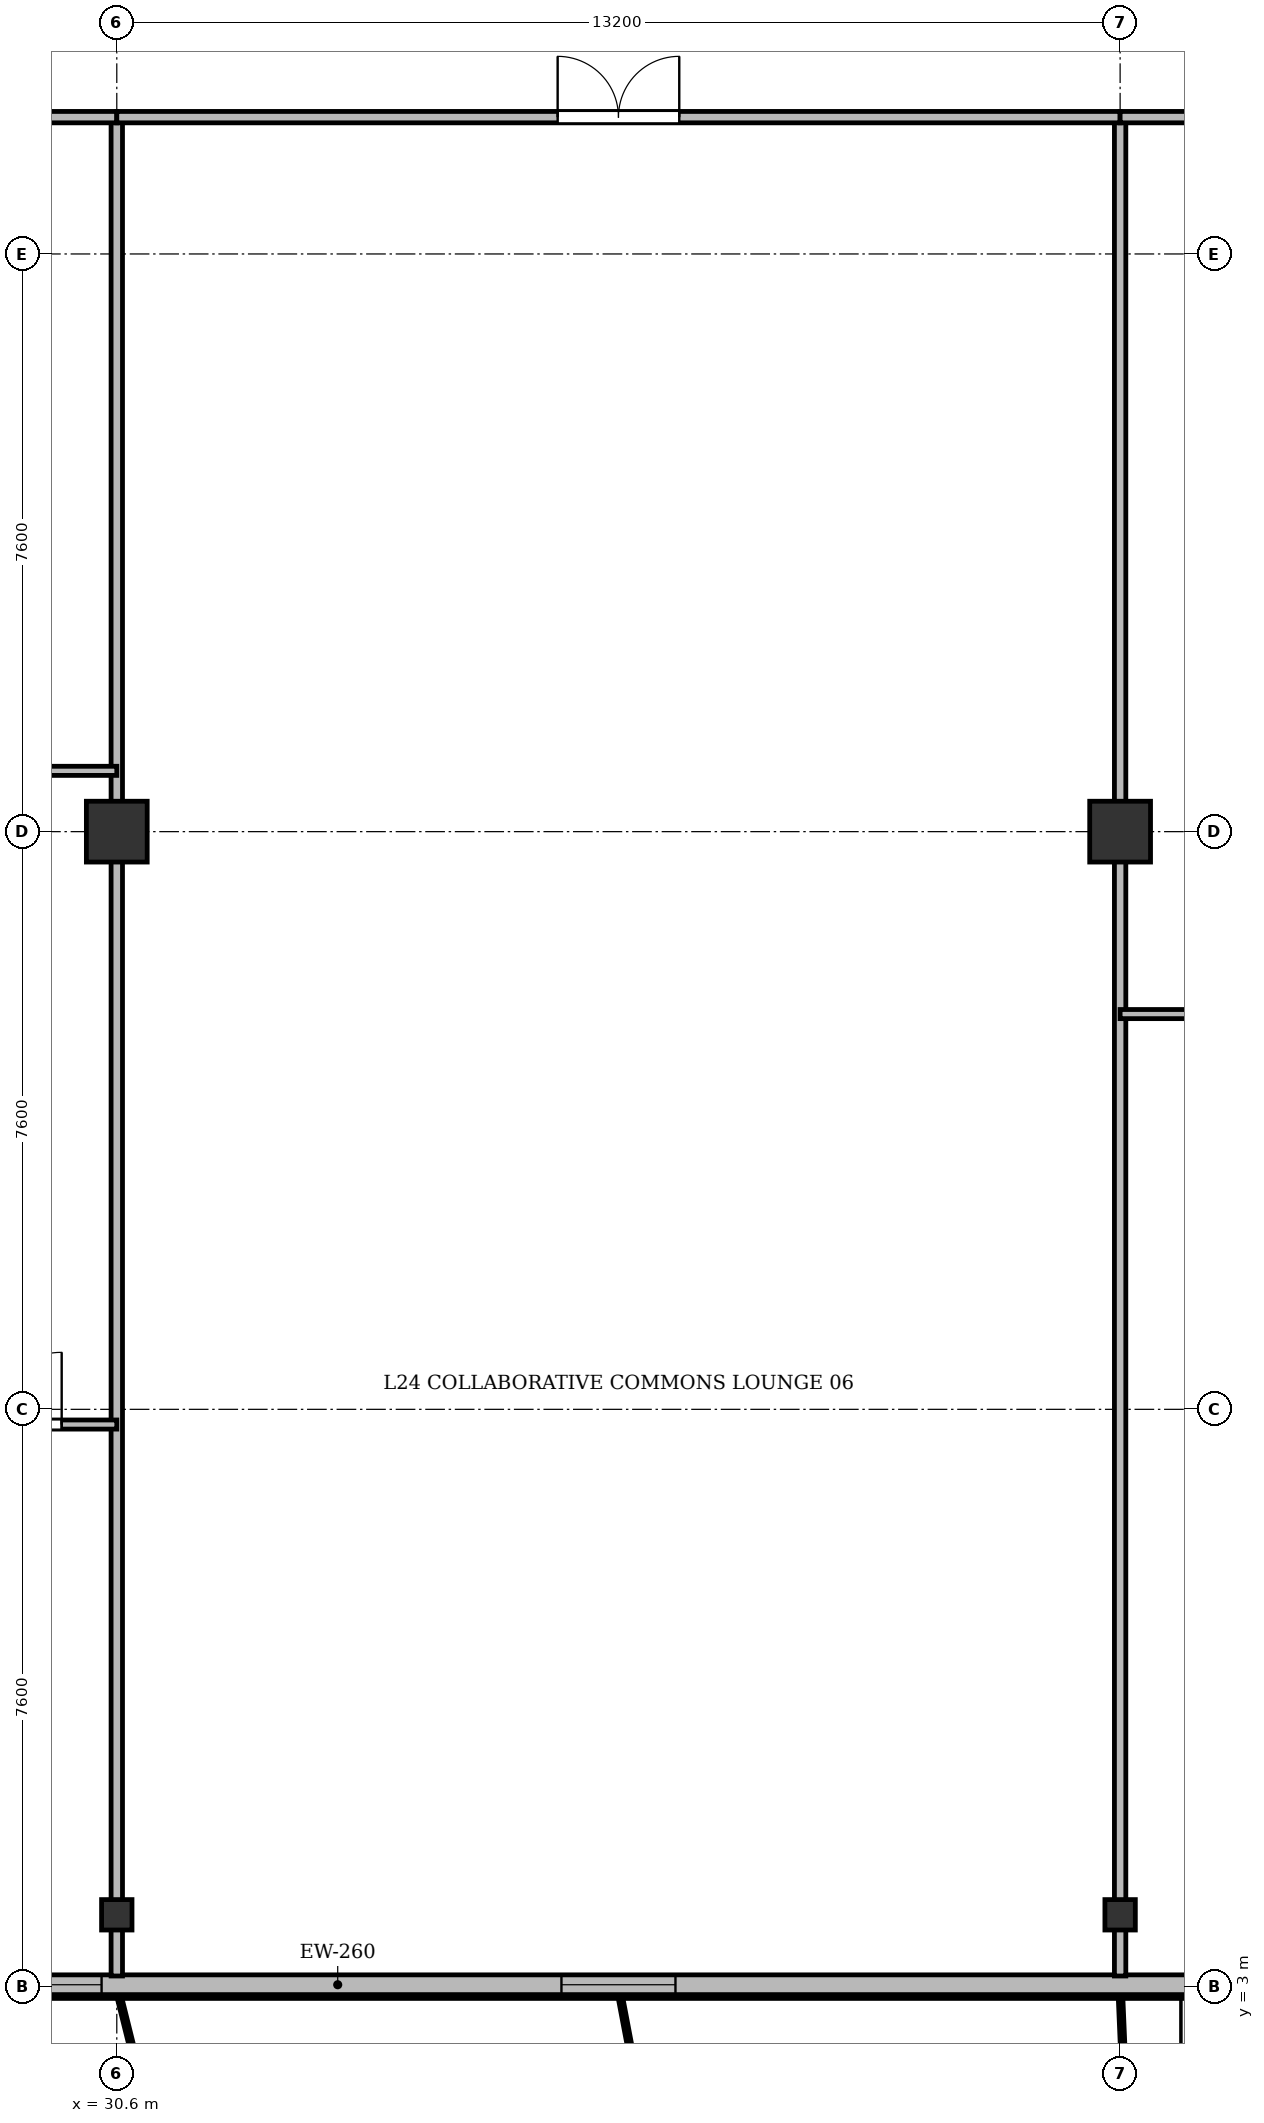
"""IFC4 building model, lengths in metres.
Left out: names, types, materials, properties, quantities, classifications, styles, units other than length and angle.
Written with IfcOpenShell. Run it as: python <this file> out.ifc"""

import sys

from ifc_helpers import new_model, si_unit, direction, frame, frame_2d, origin, origin_2d, place, context, subcontext, project, spatial, rectangle, i_section, extrude, source, transform, mapped, element, fill, save


model = new_model("IFC4")
c1 = context("Model", 3, precision=1e-05, world=origin(), true_north=direction((0.0, 1.0)))
c2 = subcontext(c1, "Body", "Model", "MODEL_VIEW")
j1 = project(units=[si_unit("LENGTHUNIT", "METRE"), si_unit("PLANEANGLEUNIT", "RADIAN")], contexts=[c1])
p1 = place(None, origin())
s1 = spatial("IfcSite", under=j1, at=p1, CompositionType="ELEMENT")
p2 = place(p1, origin())
s2 = spatial("IfcBuilding", under=s1, at=p2, CompositionType="ELEMENT")
p3 = place(p2, frame((0.0, 0.0, 96.1)))
s3 = spatial("IfcBuildingStorey", under=s2, at=p3, CompositionType="ELEMENT", Elevation=96.1)
m1 = source(origin(), c2, "Body", "SweptSolid", [
    extrude(i_section(OverallWidth=0.4, OverallDepth=0.4, WebThickness=0.022, FlangeThickness=0.035, at=origin_2d()), origin(), (0.0, 0.0, 1.0), 3.6),
])
p4 = place(p3, frame((30.6, 3.95, 0.0), z_axis=(0.0, 0.0, 1.0), x_axis=(1.0, 0.0, 0.0)))
e1 = element("IfcColumn", 1, at=p4, inside=s3, PredefinedType="COLUMN", context=c2, shape_type="MappedRepresentation", body=[
    mapped(m1, transform((0.0, 0.0, 0.0), x_axis=(1.0, 0.0, 0.0), y_axis=(0.0, 1.0, 0.0), z_axis=(0.0, 0.0, 1.0), scale=1.0)),
])
m2 = source(origin(), c2, "Body", "SweptSolid", [
    extrude(rectangle(XDim=0.8, YDim=0.8, at=origin_2d()), origin(), (0.0, 0.0, 1.0), 3.6),
])
p5 = place(p3, frame((30.6, 18.2, 0.0), z_axis=(0.0, 0.0, 1.0), x_axis=(1.0, 0.0, 0.0)))
e2 = element("IfcColumn", 2, at=p5, inside=s3, PredefinedType="COLUMN", context=c2, shape_type="MappedRepresentation", body=[
    mapped(m2, transform((0.0, 0.0, 0.0), x_axis=(1.0, 0.0, 0.0), y_axis=(0.0, 1.0, 0.0), z_axis=(0.0, 0.0, 1.0), scale=1.0)),
])
p6 = place(p3, frame((43.8, 3.95, 0.0), z_axis=(0.0, 0.0, 1.0), x_axis=(1.0, 0.0, 0.0)))
e3 = element("IfcColumn", 3, at=p6, inside=s3, PredefinedType="COLUMN", context=c2, shape_type="MappedRepresentation", body=[
    mapped(m1, transform((0.0, 0.0, 0.0), x_axis=(1.0, 0.0, 0.0), y_axis=(0.0, 1.0, 0.0), z_axis=(0.0, 0.0, 1.0), scale=1.0)),
])
p7 = place(p3, frame((43.8, 18.2, 0.0), z_axis=(0.0, 0.0, 1.0), x_axis=(1.0, 0.0, 0.0)))
e4 = element("IfcColumn", 4, at=p7, inside=s3, PredefinedType="COLUMN", context=c2, shape_type="MappedRepresentation", body=[
    mapped(m2, transform((0.0, 0.0, 0.0), x_axis=(1.0, 0.0, 0.0), y_axis=(0.0, 1.0, 0.0), z_axis=(0.0, 0.0, 1.0), scale=1.0)),
])
p8 = place(p3, frame((66.9, 3.03, 0.0), z_axis=(0.0, 0.0, 1.0), x_axis=(-1.0, 0.0, 0.0)))
e5 = element("IfcWall", 5, at=p8, inside=s3, PredefinedType="SOLIDWALL", context=c2, shape_type="SweptSolid", body=[
    extrude(rectangle(XDim=59.4, YDim=0.26, at=frame_2d((29.7, 0.0))), origin(), (0.0, 0.0, 1.0), 3.34),
])
p9 = place(p8, frame((2.1, 0.0, 0.9)))
e6 = element("IfcOpeningElement", 6, at=p9, cuts=e5, PredefinedType="OPENING", context=c2, shape_type="SweptSolid", body=[
    extrude(rectangle(XDim=1.8, YDim=1.8, at=frame_2d((0.9, 0.9))), frame((0.0, 0.14, 0.0), z_axis=(0.0, -1.0, 0.0), x_axis=(1.0, 0.0, 0.0)), (0.0, 0.0, 1.0), 0.28),
])
p10 = place(p8, frame((5.3, 0.0, 0.9)))
e7 = element("IfcOpeningElement", 7, at=p10, cuts=e5, PredefinedType="OPENING", context=c2, shape_type="SweptSolid", body=[
    extrude(rectangle(XDim=2.2, YDim=1.8, at=frame_2d((1.1, 0.9))), frame((0.0, 0.14, 0.0), z_axis=(0.0, -1.0, 0.0), x_axis=(1.0, 0.0, 0.0)), (0.0, 0.0, 1.0), 0.28),
])
p11 = place(p8, frame((8.65, 0.0, 0.9)))
e8 = element("IfcOpeningElement", 8, at=p11, cuts=e5, PredefinedType="OPENING", context=c2, shape_type="SweptSolid", body=[
    extrude(rectangle(XDim=1.5, YDim=1.75, at=frame_2d((0.75, 0.875))), frame((0.0, 0.14, 0.0), z_axis=(0.0, -1.0, 0.0), x_axis=(1.0, 0.0, 0.0)), (0.0, 0.0, 1.0), 0.28),
])
p12 = place(p8, frame((11.0, 0.0, 0.9)))
e9 = element("IfcOpeningElement", 9, at=p12, cuts=e5, PredefinedType="OPENING", context=c2, shape_type="SweptSolid", body=[
    extrude(rectangle(XDim=2.0, YDim=1.95, at=frame_2d((1.0, 0.975))), frame((0.0, 0.14, 0.0), z_axis=(0.0, -1.0, 0.0), x_axis=(1.0, 0.0, 0.0)), (0.0, 0.0, 1.0), 0.28),
])
p13 = place(p8, frame((13.775, 0.0, 0.9)))
e10 = element("IfcOpeningElement", 10, at=p13, cuts=e5, PredefinedType="OPENING", context=c2, shape_type="SweptSolid", body=[
    extrude(rectangle(XDim=1.65, YDim=1.85, at=frame_2d((0.825, 0.925))), frame((0.0, 0.14, 0.0), z_axis=(0.0, -1.0, 0.0), x_axis=(1.0, 0.0, 0.0)), (0.0, 0.0, 1.0), 0.28),
])
p14 = place(p8, frame((16.7, 0.0, 0.9)))
e11 = element("IfcOpeningElement", 11, at=p14, cuts=e5, PredefinedType="OPENING", context=c2, shape_type="SweptSolid", body=[
    extrude(rectangle(XDim=1.8, YDim=1.8, at=frame_2d((0.9, 0.9))), frame((0.0, 0.14, 0.0), z_axis=(0.0, -1.0, 0.0), x_axis=(1.0, 0.0, 0.0)), (0.0, 0.0, 1.0), 0.28),
])
p15 = place(p8, frame((20.227, 0.0, 0.0)))
e12 = element("IfcOpeningElement", 12, at=p15, cuts=e5, PredefinedType="OPENING", context=c2, shape_type="SweptSolid", body=[
    extrude(rectangle(XDim=1.2, YDim=2.2, at=frame_2d((0.6, 1.1))), frame((0.0, 0.14, 0.0), z_axis=(0.0, -1.0, 0.0), x_axis=(1.0, 0.0, 0.0)), (0.0, 0.0, 1.0), 0.28),
])
p16 = place(p8, frame((28.95, 0.0, 0.9)))
e13 = element("IfcOpeningElement", 13, at=p16, cuts=e5, PredefinedType="OPENING", context=c2, shape_type="SweptSolid", body=[
    extrude(rectangle(XDim=1.5, YDim=1.75, at=frame_2d((0.75, 0.875))), frame((0.0, 0.14, 0.0), z_axis=(0.0, -1.0, 0.0), x_axis=(1.0, 0.0, 0.0)), (0.0, 0.0, 1.0), 0.28),
])
p17 = place(p8, frame((36.5, 0.0, 0.9)))
e14 = element("IfcOpeningElement", 14, at=p17, cuts=e5, PredefinedType="OPENING", context=c2, shape_type="SweptSolid", body=[
    extrude(rectangle(XDim=2.0, YDim=1.95, at=frame_2d((1.0, 0.975))), frame((0.0, 0.14, 0.0), z_axis=(0.0, -1.0, 0.0), x_axis=(1.0, 0.0, 0.0)), (0.0, 0.0, 1.0), 0.28),
])
p18 = place(p8, frame((39.075, 0.0, 0.9)))
e15 = element("IfcOpeningElement", 15, at=p18, cuts=e5, PredefinedType="OPENING", context=c2, shape_type="SweptSolid", body=[
    extrude(rectangle(XDim=1.65, YDim=1.85, at=frame_2d((0.825, 0.925))), frame((0.0, 0.14, 0.0), z_axis=(0.0, -1.0, 0.0), x_axis=(1.0, 0.0, 0.0)), (0.0, 0.0, 1.0), 0.28),
])
p19 = place(p8, frame((41.4, 0.0, 0.9)))
e16 = element("IfcOpeningElement", 16, at=p19, cuts=e5, PredefinedType="OPENING", context=c2, shape_type="SweptSolid", body=[
    extrude(rectangle(XDim=1.8, YDim=1.8, at=frame_2d((0.9, 0.9))), frame((0.0, 0.14, 0.0), z_axis=(0.0, -1.0, 0.0), x_axis=(1.0, 0.0, 0.0)), (0.0, 0.0, 1.0), 0.28),
])
p20 = place(p8, frame((45.36, 0.0, 0.0)))
e17 = element("IfcOpeningElement", 17, at=p20, cuts=e5, PredefinedType="OPENING", context=c2, shape_type="SweptSolid", body=[
    extrude(rectangle(XDim=1.2, YDim=2.2, at=frame_2d((0.6, 1.1))), frame((0.0, 0.14, 0.0), z_axis=(0.0, -1.0, 0.0), x_axis=(1.0, 0.0, 0.0)), (0.0, 0.0, 1.0), 0.28),
])
p21 = place(p8, frame((48.55, 0.0, 0.9)))
e18 = element("IfcOpeningElement", 18, at=p21, cuts=e5, PredefinedType="OPENING", context=c2, shape_type="SweptSolid", body=[
    extrude(rectangle(XDim=1.5, YDim=1.75, at=frame_2d((0.75, 0.875))), frame((0.0, 0.14, 0.0), z_axis=(0.0, -1.0, 0.0), x_axis=(1.0, 0.0, 0.0)), (0.0, 0.0, 1.0), 0.28),
])
p22 = place(p8, frame((52.0, 0.0, 0.9)))
e19 = element("IfcOpeningElement", 19, at=p22, cuts=e5, PredefinedType="OPENING", context=c2, shape_type="SweptSolid", body=[
    extrude(rectangle(XDim=2.0, YDim=1.95, at=frame_2d((1.0, 0.975))), frame((0.0, 0.14, 0.0), z_axis=(0.0, -1.0, 0.0), x_axis=(1.0, 0.0, 0.0)), (0.0, 0.0, 1.0), 0.28),
])
p23 = place(p8, frame((55.575, 0.0, 0.9)))
e20 = element("IfcOpeningElement", 20, at=p23, cuts=e5, PredefinedType="OPENING", context=c2, shape_type="SweptSolid", body=[
    extrude(rectangle(XDim=1.65, YDim=1.85, at=frame_2d((0.825, 0.925))), frame((0.0, 0.14, 0.0), z_axis=(0.0, -1.0, 0.0), x_axis=(1.0, 0.0, 0.0)), (0.0, 0.0, 1.0), 0.28),
])
for number, where, z_axis, x_axis in (
    (21, (30.6, 3.145, 0.0), (0.0, 0.0, 1.0), (0.0, 1.0, 0.0)),
    (22, (43.8, 3.145, 0.0), (0.0, 0.0, 1.0), (0.0, 1.0, 0.0)),
):
    element("IfcWall", number, at=place(p3, frame(where, z_axis=z_axis, x_axis=x_axis)), inside=s3, PredefinedType="PARTITIONING", context=c2, shape_type="SweptSolid", body=[
        extrude(rectangle(XDim=24.455, YDim=0.15, at=frame_2d((12.228, 0.0))), origin(), (0.0, 0.0, 1.0), 2.84),
    ])
p24 = place(p3, frame((23.4, 19.0, 0.0), z_axis=(0.0, 0.0, 1.0), x_axis=(1.0, 0.0, 0.0)))
e23 = element("IfcWall", 23, at=p24, inside=s3, PredefinedType="PARTITIONING", context=c2, shape_type="SweptSolid", body=[
    extrude(rectangle(XDim=7.2, YDim=0.12, at=frame_2d((3.6, 0.0))), origin(), (0.0, 0.0, 1.0), 2.84),
])
p25 = place(p24, frame((3.125, 0.0, 0.0)))
e24 = element("IfcOpeningElement", 24, at=p25, cuts=e23, PredefinedType="OPENING", context=c2, shape_type="SweptSolid", body=[
    extrude(rectangle(XDim=0.95, YDim=2.15, at=frame_2d((0.475, 1.075))), frame((0.0, 0.07, 0.0), z_axis=(0.0, -1.0, 0.0), x_axis=(1.0, 0.0, 0.0)), (0.0, 0.0, 1.0), 0.14),
])
p26 = place(p3, frame((23.4, 27.6, 0.0), z_axis=(0.0, 0.0, 1.0), x_axis=(1.0, 0.0, 0.0)))
e25 = element("IfcWall", 25, at=p26, inside=s3, PredefinedType="PARTITIONING", context=c2, shape_type="SweptSolid", body=[
    extrude(rectangle(XDim=7.2, YDim=0.15, at=frame_2d((3.6, 0.0))), origin(), (0.0, 0.0, 1.0), 2.84),
])
p27 = place(p26, frame((4.706, 0.0, 0.0)))
e26 = element("IfcOpeningElement", 26, at=p27, cuts=e25, PredefinedType="OPENING", context=c2, shape_type="SweptSolid", body=[
    extrude(rectangle(XDim=0.95, YDim=2.15, at=frame_2d((0.475, 1.075))), frame((0.0, 0.085, 0.0), z_axis=(0.0, -1.0, 0.0), x_axis=(1.0, 0.0, 0.0)), (0.0, 0.0, 1.0), 0.17),
])
p28 = place(p3, frame((28.2, 10.4, 0.0), z_axis=(0.0, 0.0, 1.0), x_axis=(1.0, 0.0, 0.0)))
e27 = element("IfcWall", 27, at=p28, inside=s3, PredefinedType="PARTITIONING", context=c2, shape_type="SweptSolid", body=[
    extrude(rectangle(XDim=2.4, YDim=0.12, at=frame_2d((1.2, 0.0))), origin(), (0.0, 0.0, 1.0), 2.84),
])
p29 = place(p28, frame((0.725, 0.0, 0.0)))
e28 = element("IfcOpeningElement", 28, at=p29, cuts=e27, PredefinedType="OPENING", context=c2, shape_type="SweptSolid", body=[
    extrude(rectangle(XDim=0.95, YDim=2.15, at=frame_2d((0.475, 1.075))), frame((0.0, 0.07, 0.0), z_axis=(0.0, -1.0, 0.0), x_axis=(1.0, 0.0, 0.0)), (0.0, 0.0, 1.0), 0.14),
])
p30 = place(p3, frame((30.6, 27.6, 0.0), z_axis=(0.0, 0.0, 1.0), x_axis=(1.0, 0.0, 0.0)))
e29 = element("IfcWall", 29, at=p30, inside=s3, PredefinedType="PARTITIONING", context=c2, shape_type="SweptSolid", body=[
    extrude(rectangle(XDim=13.2, YDim=0.15, at=frame_2d((6.6, 0.0))), origin(), (0.0, 0.0, 1.0), 2.84),
])
p31 = place(p30, frame((5.8, 0.0, 0.0)))
e30 = element("IfcOpeningElement", 30, at=p31, cuts=e29, PredefinedType="OPENING", context=c2, shape_type="SweptSolid", body=[
    extrude(rectangle(XDim=1.6, YDim=2.2, at=frame_2d((0.8, 1.1))), frame((0.0, 0.085, 0.0), z_axis=(0.0, -1.0, 0.0), x_axis=(1.0, 0.0, 0.0)), (0.0, 0.0, 1.0), 0.17),
])
p32 = place(p3, frame((43.8, 27.6, 0.0), z_axis=(0.0, 0.0, 1.0), x_axis=(1.0, 0.0, 0.0)))
e31 = element("IfcWall", 31, at=p32, inside=s3, PredefinedType="PARTITIONING", context=c2, shape_type="SweptSolid", body=[
    extrude(rectangle(XDim=3.8, YDim=0.15, at=frame_2d((1.9, 0.0))), origin(), (0.0, 0.0, 1.0), 2.84),
])
p33 = place(p32, frame((1.33, 0.0, 0.0)))
e32 = element("IfcOpeningElement", 32, at=p33, cuts=e31, PredefinedType="OPENING", context=c2, shape_type="SweptSolid", body=[
    extrude(rectangle(XDim=0.95, YDim=2.15, at=frame_2d((0.475, 1.075))), frame((0.0, 0.085, 0.0), z_axis=(0.0, -1.0, 0.0), x_axis=(1.0, 0.0, 0.0)), (0.0, 0.0, 1.0), 0.17),
])
p34 = place(p3, frame((43.8, 15.8, 0.0), z_axis=(0.0, 0.0, 1.0), x_axis=(1.0, 0.0, 0.0)))
e33 = element("IfcWall", 33, at=p34, inside=s3, PredefinedType="PARTITIONING", context=c2, shape_type="SweptSolid", body=[
    extrude(rectangle(XDim=3.8, YDim=0.12, at=frame_2d((1.9, 0.0))), origin(), (0.0, 0.0, 1.0), 2.84),
])
p35 = place(p34, frame((1.33, 0.0, 0.0)))
e34 = element("IfcOpeningElement", 34, at=p35, cuts=e33, PredefinedType="OPENING", context=c2, shape_type="SweptSolid", body=[
    extrude(rectangle(XDim=0.95, YDim=2.15, at=frame_2d((0.475, 1.075))), frame((0.0, 0.07, 0.0), z_axis=(0.0, -1.0, 0.0), x_axis=(1.0, 0.0, 0.0)), (0.0, 0.0, 1.0), 0.14),
])
m3 = source(origin(), c2, "Body", "SweptSolid", [
    extrude(rectangle(XDim=1.5, YDim=1.75, at=frame_2d((0.75, 0.875))), frame((0.0, 0.03, 0.0), z_axis=(0.0, -1.0, 0.0), x_axis=(1.0, 0.0, 0.0)), (0.0, 0.0, 1.0), 0.06),
])
p36 = place(p16, origin())
e35 = element("IfcWindow", 35, at=p36, inside=s3, PartitioningType="SINGLE_PANEL", PredefinedType="WINDOW", context=c2, shape_type="MappedRepresentation", body=[
    mapped(m3, transform((0.0, 0.0, 0.0), x_axis=(1.0, 0.0, 0.0), y_axis=(0.0, 1.0, 0.0), z_axis=(0.0, 0.0, 1.0), scale=1.0)),
])
fill(e13, e35)
m4 = source(origin(), c2, "Body", "SweptSolid", [
    extrude(rectangle(XDim=2.0, YDim=1.95, at=frame_2d((1.0, 0.975))), frame((0.0, 0.03, 0.0), z_axis=(0.0, -1.0, 0.0), x_axis=(1.0, 0.0, 0.0)), (0.0, 0.0, 1.0), 0.06),
])
p37 = place(p17, origin())
e36 = element("IfcWindow", 36, at=p37, inside=s3, PartitioningType="SINGLE_PANEL", PredefinedType="WINDOW", context=c2, shape_type="MappedRepresentation", body=[
    mapped(m4, transform((0.0, 0.0, 0.0), x_axis=(1.0, 0.0, 0.0), y_axis=(0.0, 1.0, 0.0), z_axis=(0.0, 0.0, 1.0), scale=1.0)),
])
fill(e14, e36)
m5 = source(origin(), c2, "Body", "SweptSolid", [
    extrude(rectangle(XDim=0.95, YDim=2.15, at=frame_2d((0.475, 1.075))), frame((0.0, 0.025, 0.0), z_axis=(0.0, -1.0, 0.0), x_axis=(1.0, 0.0, 0.0)), (0.0, 0.0, 1.0), 0.05),
])
p38 = place(p29, origin())
e37 = element("IfcDoor", 37, at=p38, inside=s3, OperationType="SINGLE_SWING_RIGHT", PredefinedType="DOOR", context=c2, shape_type="MappedRepresentation", body=[
    mapped(m5, transform((0.0, 0.0, 0.0), x_axis=(1.0, 0.0, 0.0), y_axis=(0.0, 1.0, 0.0), z_axis=(0.0, 0.0, 1.0), scale=1.0)),
])
fill(e28, e37)
m6 = source(origin(), c2, "Body", "SweptSolid", [
    extrude(rectangle(XDim=1.6, YDim=2.2, at=frame_2d((0.8, 1.1))), frame((0.0, 0.025, 0.0), z_axis=(0.0, -1.0, 0.0), x_axis=(1.0, 0.0, 0.0)), (0.0, 0.0, 1.0), 0.05),
])
p39 = place(p31, origin())
e38 = element("IfcDoor", 38, at=p39, inside=s3, OperationType="DOUBLE_DOOR_SINGLE_SWING", PredefinedType="DOOR", context=c2, shape_type="MappedRepresentation", body=[
    mapped(m6, transform((0.0, 0.0, 0.0), x_axis=(1.0, 0.0, 0.0), y_axis=(0.0, 1.0, 0.0), z_axis=(0.0, 0.0, 1.0), scale=1.0)),
])
fill(e30, e38)
save(model, sys.argv[1])
